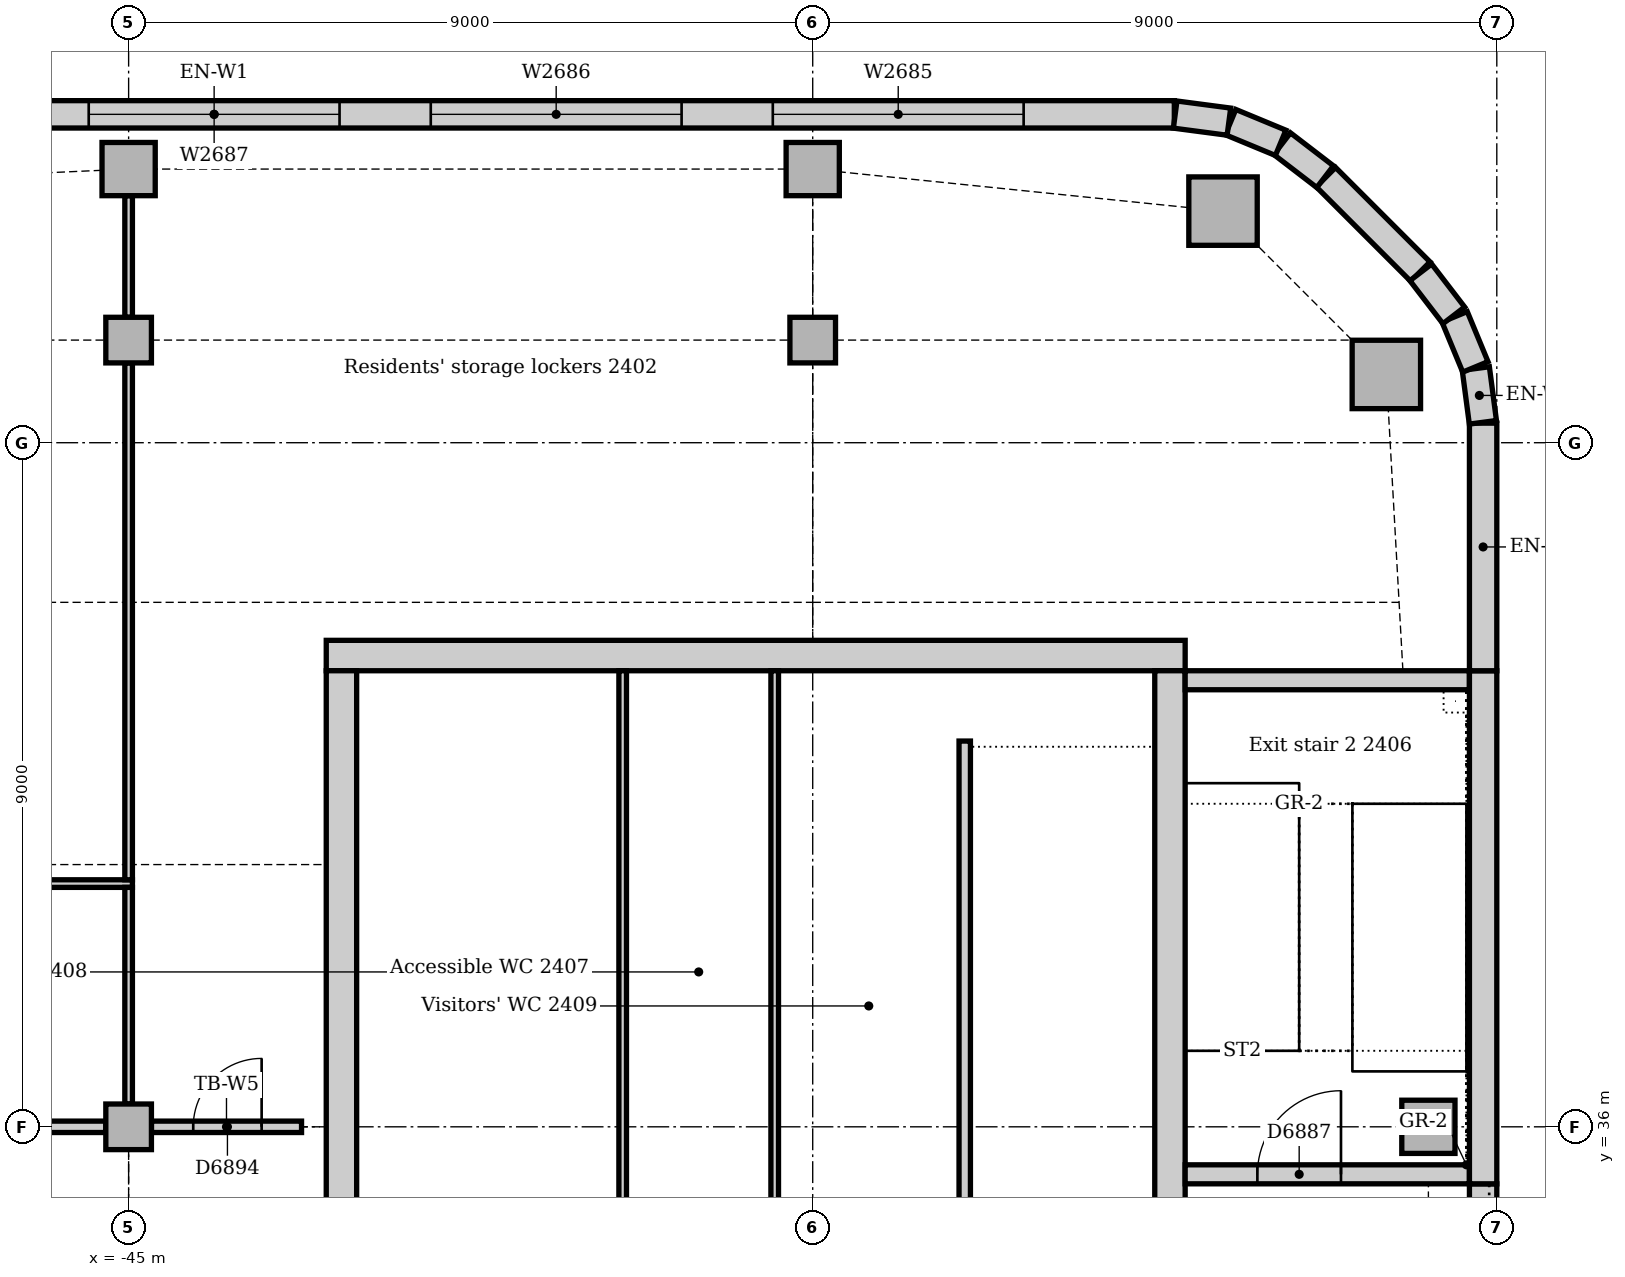
"""IFC4 building model, lengths in metres.
Left out: names, types, materials, properties, quantities, classifications, styles, units other than length and angle.
Written with IfcOpenShell. Run it as: python <this file> out.ifc"""

import sys

from ifc_helpers import new_model, si_unit, direction, frame, frame_2d, origin, origin_2d, place, context, subcontext, project, spatial, rectangle, extrude, element, fill, save


model = new_model("IFC4")
c1 = context("Model", 3, precision=1e-05, world=origin(), true_north=direction((0.0, 1.0)))
c2 = subcontext(c1, "Body", "Model", "MODEL_VIEW")
j1 = project(units=[si_unit("LENGTHUNIT", "METRE"), si_unit("PLANEANGLEUNIT", "RADIAN")], contexts=[c1])
p1 = place(None, origin())
s1 = spatial("IfcSite", under=j1, at=p1, CompositionType="ELEMENT")
p2 = place(p1, origin())
s2 = spatial("IfcBuilding", under=s1, at=p2, CompositionType="ELEMENT")
p3 = place(p2, frame((0.0, 0.0, 104.0)))
s3 = spatial("IfcBuildingStorey", under=s2, at=p3, CompositionType="ELEMENT", Elevation=104.0)
p4 = place(p3, frame((-31.1, 42.2, 0.0), z_axis=(0.0, 0.0, 1.0), x_axis=(-1.0, 0.0, 0.0)))
e1 = element("IfcWall", 1, at=p4, inside=s3, PredefinedType="SOLIDWALL", context=c2, shape_type="SweptSolid", body=[
    extrude(rectangle(XDim=11.3, YDim=0.4, at=frame_2d((5.65, 0.0))), origin(), (0.0, 0.0, 1.0), 4.0),
])
p5 = place(p3, frame((-31.3, 30.5, 0.0), z_axis=(0.0, 0.0, 1.0), x_axis=(0.0, 1.0, 0.0)))
e2 = element("IfcWall", 2, at=p5, inside=s3, PredefinedType="SOLIDWALL", context=c2, shape_type="SweptSolid", body=[
    extrude(rectangle(XDim=11.5, YDim=0.4, at=frame_2d((5.75, 0.0))), origin(), (0.0, 0.0, 1.0), 4.0),
])
p6 = place(p5, frame((0.85, 0.0, 0.0)))
e3 = element("IfcOpeningElement", 3, at=p6, cuts=e2, PredefinedType="OPENING", context=c2, shape_type="SweptSolid", body=[
    extrude(rectangle(XDim=1.8, YDim=2.1, at=frame_2d((0.9, 1.05))), frame((0.0, 0.21, 0.0), z_axis=(0.0, -1.0, 0.0), x_axis=(1.0, 0.0, 0.0)), (0.0, 0.0, 1.0), 0.42),
])
p7 = place(p3, frame((-42.2, 42.0, 0.0), z_axis=(0.0, 0.0, 1.0), x_axis=(0.0, -1.0, 0.0)))
e4 = element("IfcWall", 4, at=p7, inside=s3, PredefinedType="SOLIDWALL", context=c2, shape_type="SweptSolid", body=[
    extrude(rectangle(XDim=11.5, YDim=0.4, at=frame_2d((5.75, 0.0))), origin(), (0.0, 0.0, 1.0), 4.0),
])
p8 = place(p7, frame((8.85, 0.0, 0.0)))
e5 = element("IfcOpeningElement", 5, at=p8, cuts=e4, PredefinedType="OPENING", context=c2, shape_type="SweptSolid", body=[
    extrude(rectangle(XDim=1.8, YDim=2.1, at=frame_2d((0.9, 1.05))), frame((0.0, 0.21, 0.0), z_axis=(0.0, -1.0, 0.0), x_axis=(1.0, 0.0, 0.0)), (0.0, 0.0, 1.0), 0.42),
])
p9 = place(p3, frame((-31.1, 35.375, 0.0), z_axis=(0.0, 0.0, 1.0), x_axis=(1.0, 0.0, 0.0)))
e6 = element("IfcWall", 6, at=p9, inside=s3, PredefinedType="SOLIDWALL", context=c2, shape_type="SweptSolid", body=[
    extrude(rectangle(XDim=3.74, YDim=0.25, at=frame_2d((1.87, 0.0))), origin(), (0.0, 0.0, 1.0), 4.0),
])
p10 = place(p9, frame((0.95, 0.0, 0.0)))
e7 = element("IfcOpeningElement", 7, at=p10, cuts=e6, PredefinedType="OPENING", context=c2, shape_type="SweptSolid", body=[
    extrude(rectangle(XDim=1.1, YDim=2.1, at=frame_2d((0.55, 1.05))), frame((0.0, 0.135, 0.0), z_axis=(0.0, -1.0, 0.0), x_axis=(1.0, 0.0, 0.0)), (0.0, 0.0, 1.0), 0.27),
])
p11 = place(p3, frame((-27.36, 41.875, 0.0), z_axis=(0.0, 0.0, 1.0), x_axis=(-1.0, 0.0, 0.0)))
e8 = element("IfcWall", 8, at=p11, inside=s3, PredefinedType="SOLIDWALL", context=c2, shape_type="SweptSolid", body=[
    extrude(rectangle(XDim=3.74, YDim=0.25, at=frame_2d((1.87, 0.0))), origin(), (0.0, 0.0, 1.0), 4.0),
])
for number, where, z_axis, x_axis in (
    (9, (-28.453, 45.898, 0.0), (0.0, 0.0, 1.0), (1.0, 0.0, 0.0)),
    (10, (-30.602, 48.047, 0.0), (0.0, 0.0, 1.0), (1.0, 0.0, 0.0)),
):
    element("IfcColumn", number, at=place(p3, frame(where, z_axis=z_axis, x_axis=x_axis)), inside=s3, PredefinedType="COLUMN", context=c2, shape_type="SweptSolid", body=[
        extrude(rectangle(XDim=0.9, YDim=0.9, at=origin_2d()), origin(), (0.0, 0.0, 1.0), 3.85),
    ])
p12 = place(p3, frame((-27.9, 36.0, 0.0), z_axis=(0.0, 0.0, 1.0), x_axis=(1.0, 0.0, 0.0)))
e11 = element("IfcColumn", 11, at=p12, inside=s3, PredefinedType="COLUMN", context=c2, shape_type="SweptSolid", body=[
    extrude(rectangle(XDim=0.7, YDim=0.7, at=origin_2d()), origin(), (0.0, 0.0, 1.0), 4.0),
])
for number, where, z_axis, x_axis in (
    (12, (-45.0, 48.6, 0.0), (0.0, 0.0, 1.0), (1.0, 0.0, 0.0)),
    (13, (-36.0, 48.6, 0.0), (0.0, 0.0, 1.0), (1.0, 0.0, 0.0)),
):
    element("IfcColumn", number, at=place(p3, frame(where, z_axis=z_axis, x_axis=x_axis)), inside=s3, PredefinedType="COLUMN", context=c2, shape_type="SweptSolid", body=[
        extrude(rectangle(XDim=0.7, YDim=0.7, at=origin_2d()), origin(), (0.0, 0.0, 1.0), 3.85),
    ])
for number, where, z_axis, x_axis in (
    (14, (-45.0, 36.0, 0.0), (0.0, 0.0, 1.0), (1.0, 0.0, 0.0)),
    (15, (-45.0, 46.35, 0.0), (0.0, 0.0, 1.0), (1.0, 0.0, 0.0)),
    (16, (-36.0, 46.35, 0.0), (0.0, 0.0, 1.0), (1.0, 0.0, 0.0)),
):
    element("IfcColumn", number, at=place(p3, frame(where, z_axis=z_axis, x_axis=x_axis)), inside=s3, PredefinedType="COLUMN", context=c2, shape_type="SweptSolid", body=[
        extrude(rectangle(XDim=0.6, YDim=0.6, at=origin_2d()), origin(), (0.0, 0.0, 1.0), 3.85),
    ])
p13 = place(p3, frame((-27.18, 27.75, 0.0), z_axis=(0.0, 0.0, 1.0), x_axis=(0.0, 1.0, 0.0)))
e17 = element("IfcWall", 17, at=p13, inside=s3, PredefinedType="STANDARD", context=c2, shape_type="SweptSolid", body=[
    extrude(rectangle(XDim=7.5, YDim=0.36, at=frame_2d((3.75, 0.0))), origin(), (0.0, 0.0, 1.0), 3.85),
])
p14 = place(p13, frame((2.85, 0.0, 1.2)))
e18 = element("IfcOpeningElement", 18, at=p14, cuts=e17, PredefinedType="OPENING", context=c2, shape_type="SweptSolid", body=[
    extrude(rectangle(XDim=1.8, YDim=1.2, at=frame_2d((0.9, 0.6))), frame((0.0, 0.19, 0.0), z_axis=(0.0, -1.0, 0.0), x_axis=(1.0, 0.0, 0.0)), (0.0, 0.0, 1.0), 0.38),
])
p15 = place(p3, frame((-27.18, 35.25, 0.0), z_axis=(0.0, 0.0, 1.0), x_axis=(0.0, 1.0, 0.0)))
e19 = element("IfcWall", 19, at=p15, inside=s3, PredefinedType="STANDARD", context=c2, shape_type="SweptSolid", body=[
    extrude(rectangle(XDim=6.75, YDim=0.36, at=frame_2d((3.375, 0.0))), origin(), (0.0, 0.0, 1.0), 3.85),
])
p16 = place(p3, frame((-27.18, 42.0, 0.0), z_axis=(0.0, 0.0, 1.0), x_axis=(0.0, 1.0, 0.0)))
e20 = element("IfcWall", 20, at=p16, inside=s3, PredefinedType="STANDARD", context=c2, shape_type="SweptSolid", body=[
    extrude(rectangle(XDim=3.257, YDim=0.36, at=frame_2d((1.629, 0.0))), origin(), (0.0, 0.0, 1.0), 3.85),
])
p17 = place(p3, frame((-28.006, 47.251, 0.0), z_axis=(0.0, 0.0, 1.0), x_axis=(-0.707106781187, 0.707106781187, 0.0)))
e21 = element("IfcWall", 21, at=p17, inside=s3, PredefinedType="STANDARD", context=c2, shape_type="SweptSolid", body=[
    extrude(rectangle(XDim=1.757, YDim=0.36, at=frame_2d((0.879, 0.0))), origin(), (0.0, 0.0, 1.0), 3.85),
])
p18 = place(p3, frame((-31.243, 49.32, 0.0), z_axis=(0.0, 0.0, 1.0), x_axis=(-1.0, 0.0, 0.0)))
e22 = element("IfcWall", 22, at=p18, inside=s3, PredefinedType="STANDARD", context=c2, shape_type="SweptSolid", body=[
    extrude(rectangle(XDim=25.265, YDim=0.36, at=frame_2d((12.632, 0.0))), origin(), (0.0, 0.0, 1.0), 3.85),
])
p19 = place(p18, frame((1.982, 0.0, 0.9)))
e23 = element("IfcOpeningElement", 23, at=p19, cuts=e22, PredefinedType="OPENING", context=c2, shape_type="SweptSolid", body=[
    extrude(rectangle(XDim=3.3, YDim=1.6, at=frame_2d((1.65, 0.8))), frame((0.0, 0.19, 0.0), z_axis=(0.0, -1.0, 0.0), x_axis=(1.0, 0.0, 0.0)), (0.0, 0.0, 1.0), 0.38),
])
p20 = place(p18, frame((6.482, 0.0, 0.9)))
e24 = element("IfcOpeningElement", 24, at=p20, cuts=e22, PredefinedType="OPENING", context=c2, shape_type="SweptSolid", body=[
    extrude(rectangle(XDim=3.3, YDim=1.6, at=frame_2d((1.65, 0.8))), frame((0.0, 0.19, 0.0), z_axis=(0.0, -1.0, 0.0), x_axis=(1.0, 0.0, 0.0)), (0.0, 0.0, 1.0), 0.38),
])
p21 = place(p18, frame((10.982, 0.0, 0.9)))
e25 = element("IfcOpeningElement", 25, at=p21, cuts=e22, PredefinedType="OPENING", context=c2, shape_type="SweptSolid", body=[
    extrude(rectangle(XDim=3.3, YDim=1.6, at=frame_2d((1.65, 0.8))), frame((0.0, 0.19, 0.0), z_axis=(0.0, -1.0, 0.0), x_axis=(1.0, 0.0, 0.0)), (0.0, 0.0, 1.0), 0.38),
])
p22 = place(p18, frame((15.482, 0.0, 0.9)))
e26 = element("IfcOpeningElement", 26, at=p22, cuts=e22, PredefinedType="OPENING", context=c2, shape_type="SweptSolid", body=[
    extrude(rectangle(XDim=3.3, YDim=1.6, at=frame_2d((1.65, 0.8))), frame((0.0, 0.19, 0.0), z_axis=(0.0, -1.0, 0.0), x_axis=(1.0, 0.0, 0.0)), (0.0, 0.0, 1.0), 0.38),
])
p23 = place(p18, frame((19.982, 0.0, 0.9)))
e27 = element("IfcOpeningElement", 27, at=p23, cuts=e22, PredefinedType="OPENING", context=c2, shape_type="SweptSolid", body=[
    extrude(rectangle(XDim=3.3, YDim=1.6, at=frame_2d((1.65, 0.8))), frame((0.0, 0.19, 0.0), z_axis=(0.0, -1.0, 0.0), x_axis=(1.0, 0.0, 0.0)), (0.0, 0.0, 1.0), 0.38),
])
for number, where, z_axis, x_axis in (
    (28, (-27.183, 45.269, 0.0), (0.0, 0.0, 1.0), (-0.131, 0.991, 0.0)),
    (29, (-27.282, 45.997, 0.0), (0.0, 0.0, 1.0), (-0.383, 0.924, 0.0)),
):
    element("IfcWall", number, at=place(p3, frame(where, z_axis=z_axis, x_axis=x_axis)), inside=s3, PredefinedType="STANDARD", context=c2, shape_type="SweptSolid", body=[
        extrude(rectangle(XDim=0.713, YDim=0.36, at=frame_2d((0.356, 0.0))), origin(), (0.0, 0.0, 1.0), 3.85),
    ])
for number, where, z_axis, x_axis in (
    (30, (-27.566, 46.675, 0.0), (0.0, 0.0, 1.0), (-0.609, 0.793, 0.0)),
    (31, (-29.259, 48.5, 0.0), (0.0, 0.0, 1.0), (-0.793, 0.609, 0.0)),
):
    element("IfcWall", number, at=place(p3, frame(where, z_axis=z_axis, x_axis=x_axis)), inside=s3, PredefinedType="STANDARD", context=c2, shape_type="SweptSolid", body=[
        extrude(rectangle(XDim=0.713, YDim=0.36, at=frame_2d((0.357, 0.0))), origin(), (0.0, 0.0, 1.0), 3.85),
    ])
for number, where, z_axis, x_axis in (
    (32, (-29.844, 48.945, 0.0), (0.0, 0.0, 1.0), (-0.924, 0.383, 0.0)),
    (33, (-30.524, 49.224, 0.0), (0.0, 0.0, 1.0), (-0.991, 0.131, 0.0)),
):
    element("IfcWall", number, at=place(p3, frame(where, z_axis=z_axis, x_axis=x_axis)), inside=s3, PredefinedType="STANDARD", context=c2, shape_type="SweptSolid", body=[
        extrude(rectangle(XDim=0.713, YDim=0.36, at=frame_2d((0.356, 0.0))), origin(), (0.0, 0.0, 1.0), 3.85),
    ])
p24 = place(p3, frame((-34.0, 41.075, 0.0), z_axis=(0.0, 0.0, 1.0), x_axis=(0.0, -1.0, 0.0)))
e34 = element("IfcWall", 34, at=p24, inside=s3, PredefinedType="SOLIDWALL", context=c2, shape_type="SweptSolid", body=[
    extrude(rectangle(XDim=7.0, YDim=0.15, at=frame_2d((3.5, 0.0))), origin(), (0.0, 0.0, 1.0), 4.0),
])
for number, where, z_axis, x_axis in (
    (35, (-38.5, 34.075, 0.0), (0.0, 0.0, 1.0), (0.0, 1.0, 0.0)),
    (36, (-36.5, 34.075, 0.0), (0.0, 0.0, 1.0), (0.0, 1.0, 0.0)),
):
    element("IfcWall", number, at=place(p3, frame(where, z_axis=z_axis, x_axis=x_axis)), inside=s3, PredefinedType="PARTITIONING", context=c2, shape_type="SweptSolid", body=[
        extrude(rectangle(XDim=7.925, YDim=0.1, at=frame_2d((3.962, 0.0))), origin(), (0.0, 0.0, 1.0), 3.85),
    ])
p25 = place(p3, frame((-44.7, 36.0, 0.0), z_axis=(0.0, 0.0, 1.0), x_axis=(1.0, 0.0, 0.0)))
e37 = element("IfcWall", 37, at=p25, inside=s3, PredefinedType="PARTITIONING", context=c2, shape_type="SweptSolid", body=[
    extrude(rectangle(XDim=1.975, YDim=0.15, at=frame_2d((0.988, 0.0))), origin(), (0.0, 0.0, 1.0), 3.602),
])
p26 = place(p25, frame((0.55, 0.0, 0.0)))
e38 = element("IfcOpeningElement", 38, at=p26, cuts=e37, PredefinedType="OPENING", context=c2, shape_type="SweptSolid", body=[
    extrude(rectangle(XDim=0.9, YDim=2.1, at=frame_2d((0.45, 1.05))), frame((0.0, 0.085, 0.0), z_axis=(0.0, -1.0, 0.0), x_axis=(1.0, 0.0, 0.0)), (0.0, 0.0, 1.0), 0.17),
])
p27 = place(p3, frame((-53.7, 36.0, 0.0), z_axis=(0.0, 0.0, 1.0), x_axis=(1.0, 0.0, 0.0)))
e39 = element("IfcWall", 39, at=p27, inside=s3, PredefinedType="PARTITIONING", context=c2, shape_type="SweptSolid", body=[
    extrude(rectangle(XDim=8.4, YDim=0.15, at=frame_2d((4.2, 0.0))), origin(), (0.0, 0.0, 1.0), 3.262),
])
p28 = place(p27, frame((0.3, 0.0, 0.0)))
e40 = element("IfcOpeningElement", 40, at=p28, cuts=e39, PredefinedType="OPENING", context=c2, shape_type="SweptSolid", body=[
    extrude(rectangle(XDim=1.0, YDim=2.1, at=frame_2d((0.5, 1.05))), frame((0.0, 0.085, 0.0), z_axis=(0.0, -1.0, 0.0), x_axis=(1.0, 0.0, 0.0)), (0.0, 0.0, 1.0), 0.17),
])
p29 = place(p3, frame((-60.39, 39.2, 0.0), z_axis=(0.0, 0.0, 1.0), x_axis=(1.0, 0.0, 0.0)))
e41 = element("IfcWall", 41, at=p29, inside=s3, PredefinedType="PARTITIONING", context=c2, shape_type="SweptSolid", body=[
    extrude(rectangle(XDim=15.44, YDim=0.1, at=frame_2d((7.72, 0.0))), origin(), (0.0, 0.0, 1.0), 3.85),
])
p30 = place(p29, frame((6.021, 0.0, 0.0)))
e42 = element("IfcOpeningElement", 42, at=p30, cuts=e41, PredefinedType="OPENING", context=c2, shape_type="SweptSolid", body=[
    extrude(rectangle(XDim=0.9, YDim=2.1, at=frame_2d((0.45, 1.05))), frame((0.0, 0.06, 0.0), z_axis=(0.0, -1.0, 0.0), x_axis=(1.0, 0.0, 0.0)), (0.0, 0.0, 1.0), 0.12),
])
p31 = place(p3, frame((-45.0, 39.25, 0.0), z_axis=(0.0, 0.0, 1.0), x_axis=(0.0, 1.0, 0.0)))
e43 = element("IfcWall", 43, at=p31, inside=s3, PredefinedType="PARTITIONING", context=c2, shape_type="SweptSolid", body=[
    extrude(rectangle(XDim=6.8, YDim=0.1, at=frame_2d((3.4, 0.0))), origin(), (0.0, 0.0, 1.0), 3.362),
])
p32 = place(p3, frame((-45.0, 36.3, 0.0), z_axis=(0.0, 0.0, 1.0), x_axis=(0.0, 1.0, 0.0)))
e44 = element("IfcWall", 44, at=p32, inside=s3, PredefinedType="PARTITIONING", context=c2, shape_type="SweptSolid", body=[
    extrude(rectangle(XDim=2.85, YDim=0.1, at=frame_2d((1.425, 0.0))), origin(), (0.0, 0.0, 1.0), 3.362),
])
p33 = place(p3, frame((-45.0, 46.65, 0.0), z_axis=(0.0, 0.0, 1.0), x_axis=(0.0, 1.0, 0.0)))
e45 = element("IfcWall", 45, at=p33, inside=s3, PredefinedType="PARTITIONING", context=c2, shape_type="SweptSolid", body=[
    extrude(rectangle(XDim=1.6, YDim=0.1, at=frame_2d((0.8, 0.0))), origin(), (0.0, 0.0, 1.0), 3.652),
])
p34 = place(p19, origin())
e46 = element("IfcWindow", 46, at=p34, inside=s3, PartitioningType="SINGLE_PANEL", PredefinedType="WINDOW", context=c2, shape_type="SweptSolid", body=[
    extrude(rectangle(XDim=3.3, YDim=1.6, at=frame_2d((1.65, 0.8))), frame((0.0, 0.13, 0.0), z_axis=(0.0, -1.0, 0.0), x_axis=(1.0, 0.0, 0.0)), (0.0, 0.0, 1.0), 0.06),
])
fill(e23, e46)
p35 = place(p20, origin())
e47 = element("IfcWindow", 47, at=p35, inside=s3, PartitioningType="SINGLE_PANEL", PredefinedType="WINDOW", context=c2, shape_type="SweptSolid", body=[
    extrude(rectangle(XDim=3.3, YDim=1.6, at=frame_2d((1.65, 0.8))), frame((0.0, 0.13, 0.0), z_axis=(0.0, -1.0, 0.0), x_axis=(1.0, 0.0, 0.0)), (0.0, 0.0, 1.0), 0.06),
])
fill(e24, e47)
p36 = place(p21, origin())
e48 = element("IfcWindow", 48, at=p36, inside=s3, PartitioningType="SINGLE_PANEL", PredefinedType="WINDOW", context=c2, shape_type="SweptSolid", body=[
    extrude(rectangle(XDim=3.3, YDim=1.6, at=frame_2d((1.65, 0.8))), frame((0.0, 0.13, 0.0), z_axis=(0.0, -1.0, 0.0), x_axis=(1.0, 0.0, 0.0)), (0.0, 0.0, 1.0), 0.06),
])
fill(e25, e48)
p37 = place(p10, origin())
e49 = element("IfcDoor", 49, at=p37, inside=s3, OperationType="SINGLE_SWING_RIGHT", PredefinedType="DOOR", context=c2, shape_type="SweptSolid", body=[
    extrude(rectangle(XDim=1.1, YDim=2.1, at=frame_2d((0.55, 1.05))), frame((0.0, 0.025, 0.0), z_axis=(0.0, -1.0, 0.0), x_axis=(1.0, 0.0, 0.0)), (0.0, 0.0, 1.0), 0.05),
])
fill(e7, e49)
p38 = place(p26, origin())
e50 = element("IfcDoor", 50, at=p38, inside=s3, OperationType="SINGLE_SWING_RIGHT", PredefinedType="DOOR", context=c2, shape_type="SweptSolid", body=[
    extrude(rectangle(XDim=0.9, YDim=2.1, at=frame_2d((0.45, 1.05))), frame((0.0, 0.025, 0.0), z_axis=(0.0, -1.0, 0.0), x_axis=(1.0, 0.0, 0.0)), (0.0, 0.0, 1.0), 0.05),
])
fill(e38, e50)
save(model, sys.argv[1])
